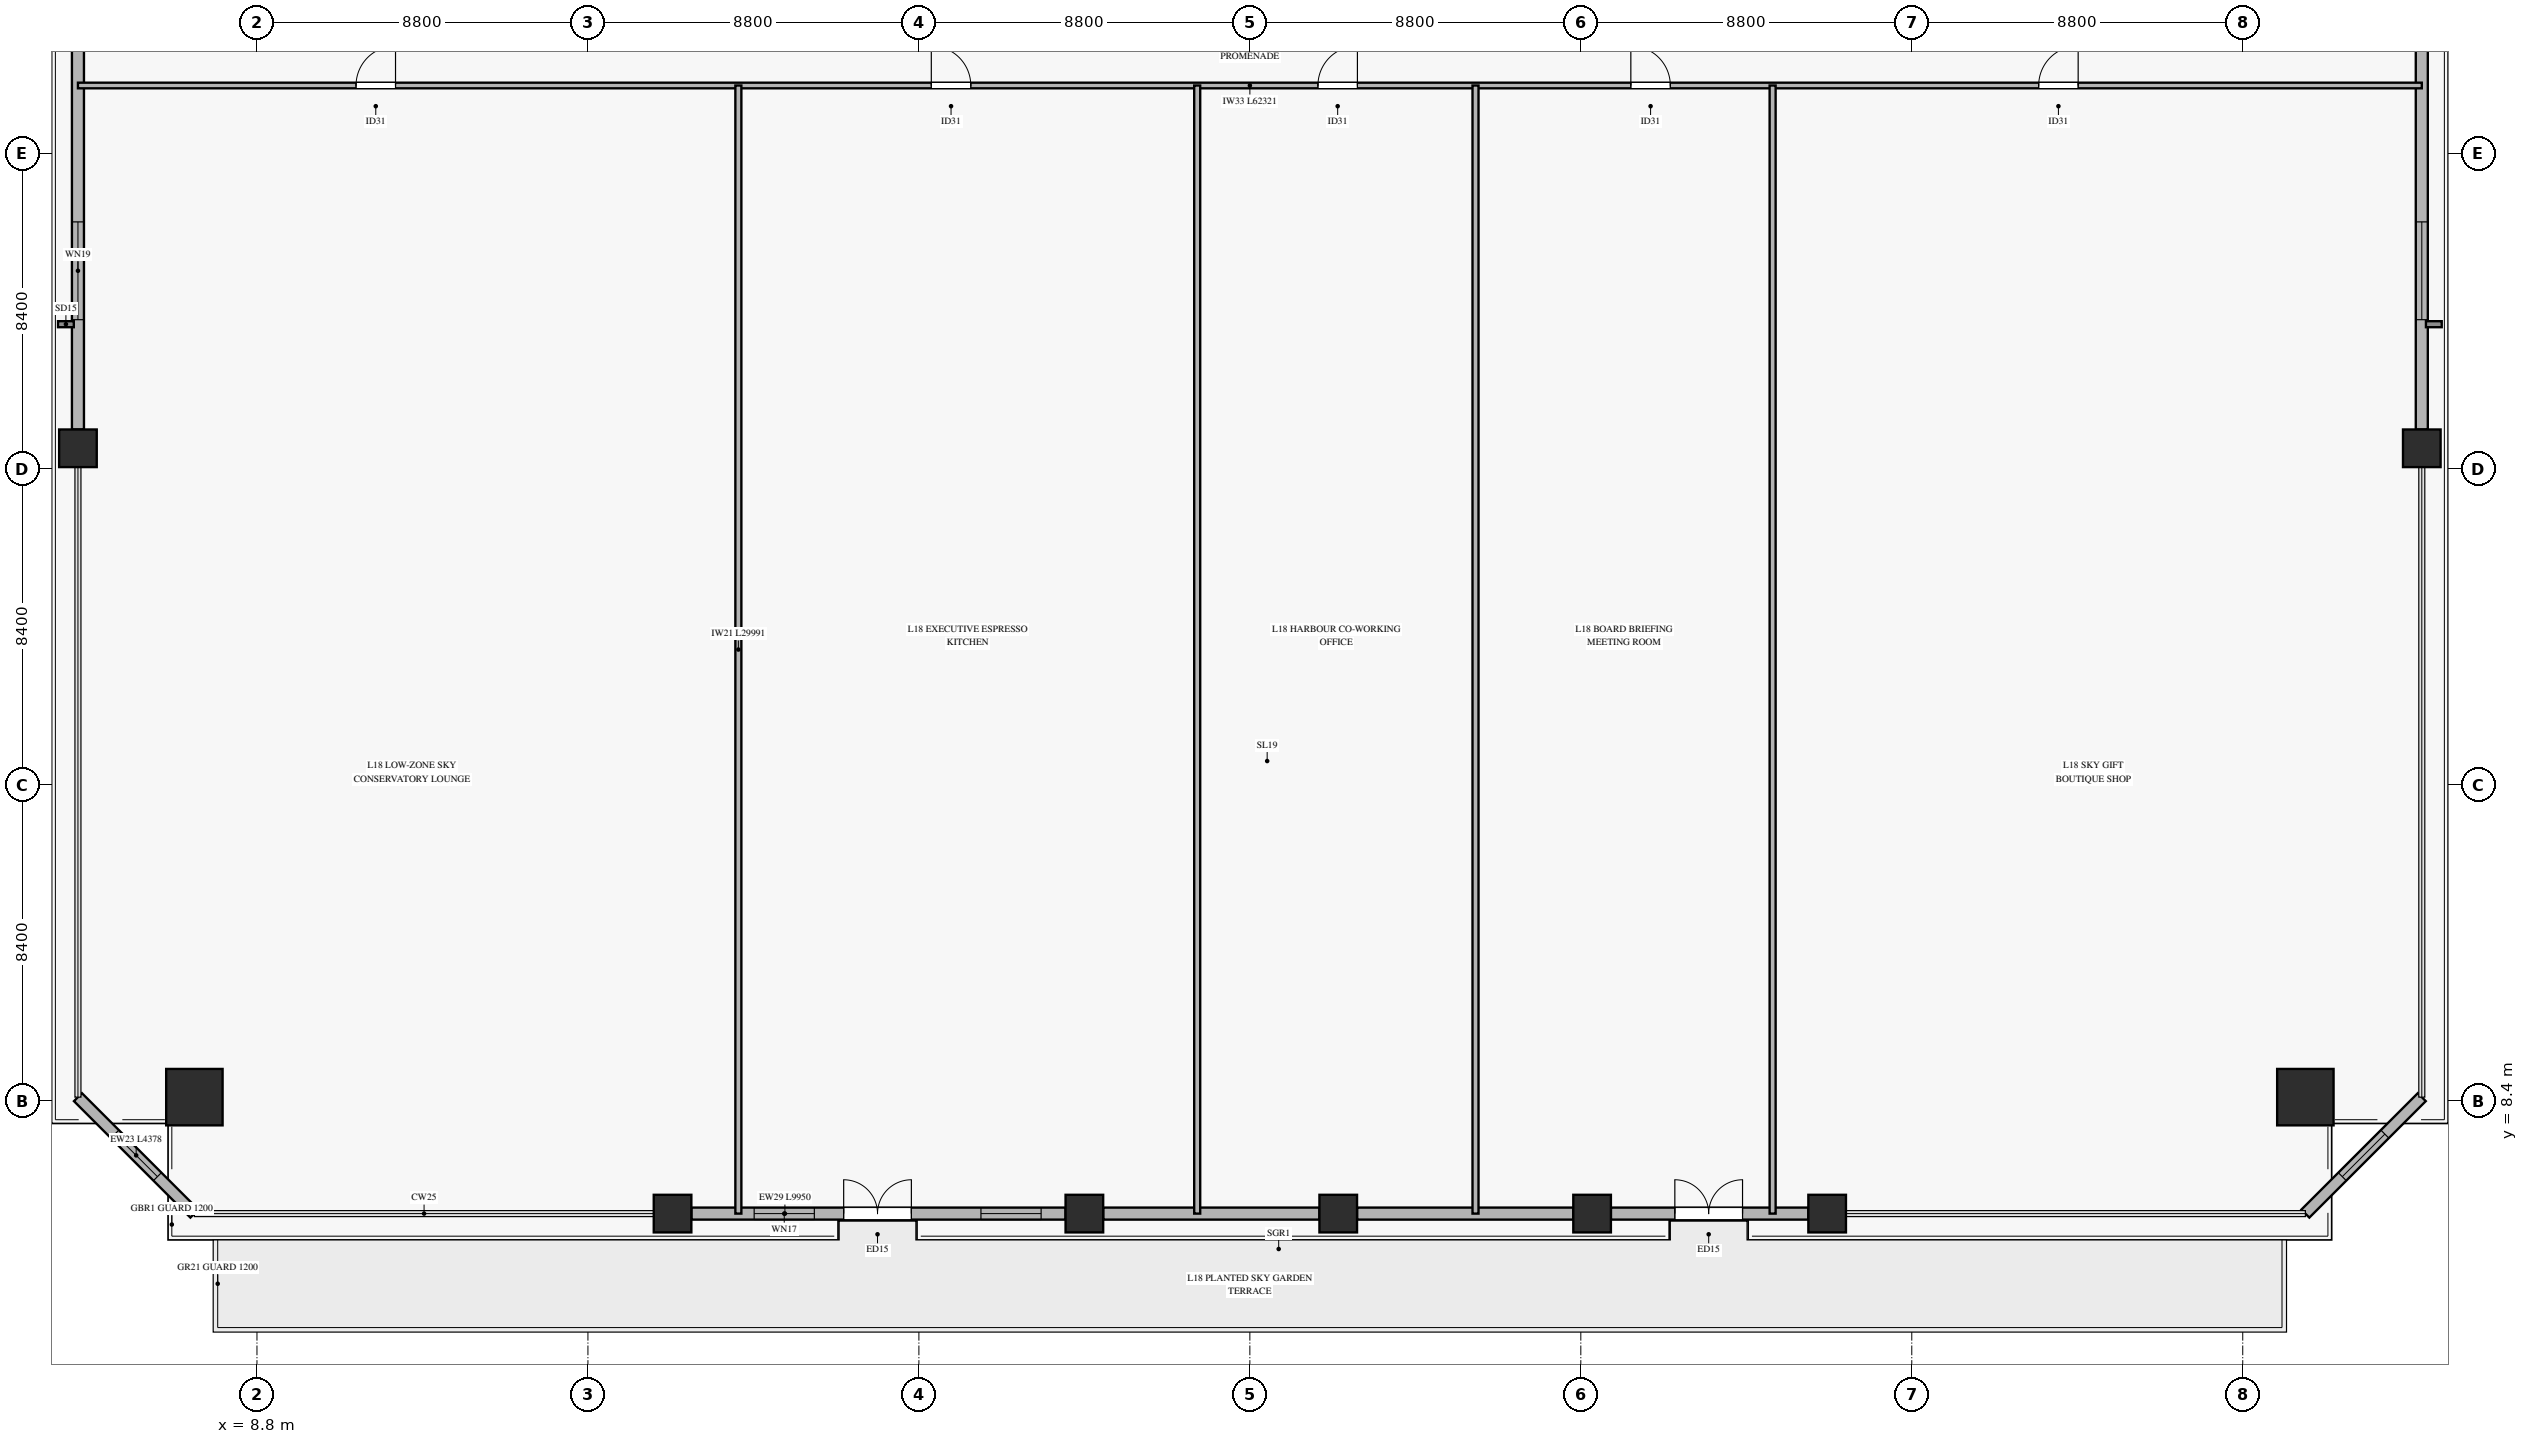
"""IFC4 building model, lengths in metres.
Left out: names, types, materials, properties, quantities, classifications, styles, units other than length and angle.
Written with IfcOpenShell. Run it as: python <this file> out.ifc"""

import sys

from ifc_helpers import new_model, si_unit, direction, frame, frame_2d, origin, origin_2d, place, context, subcontext, project, spatial, rectangle, hollow_rectangle, extrude, source, transform, mapped, element, fill, save


model = new_model("IFC4")
c1 = context("Model", 3, precision=1e-05, world=origin(), true_north=direction((0.0, 1.0)))
c2 = subcontext(c1, "Body", "Model", "MODEL_VIEW")
j1 = project(units=[si_unit("LENGTHUNIT", "METRE"), si_unit("PLANEANGLEUNIT", "RADIAN")], contexts=[c1])
p1 = place(None, origin())
s1 = spatial("IfcSite", under=j1, at=p1, CompositionType="ELEMENT")
p2 = place(p1, origin())
s2 = spatial("IfcBuilding", under=s1, at=p2, CompositionType="ELEMENT")
p3 = place(p2, frame((0.0, 0.0, 72.8)))
s3 = spatial("IfcBuildingStorey", under=s2, at=p3, CompositionType="ELEMENT", Elevation=72.8)
m1 = source(origin(), c2, "Body", "SweptSolid", [
    extrude(hollow_rectangle(XDim=1.5, YDim=1.5, WallThickness=0.07, at=origin_2d()), origin(), (0.0, 0.0, 1.0), 6.58),
])
for number, where, z_axis, x_axis in (
    (1, (7.136, 8.505, 0.0), (0.0, 0.0, 1.0), (1.0, 0.0, 0.0)),
    (2, (63.265, 8.505, 0.0), (0.0, 0.0, 1.0), (1.0, 0.0, 0.0)),
):
    element("IfcColumn", number, at=place(p3, frame(where, z_axis=z_axis, x_axis=x_axis)), inside=s3, PredefinedType="COLUMN", context=c2, shape_type="MappedRepresentation", body=[
        mapped(m1, transform((0.0, 0.0, 0.0), x_axis=(1.0, 0.0, 0.0), y_axis=(0.0, 1.0, 0.0), z_axis=(0.0, 0.0, 1.0), scale=1.0)),
    ])
m2 = source(origin(), c2, "Body", "SweptSolid", [
    extrude(hollow_rectangle(XDim=1.0, YDim=1.0, WallThickness=0.045, at=origin_2d()), origin(), (0.0, 0.0, 1.0), 6.58),
])
for number, where, z_axis, x_axis in (
    (3, (19.85, 5.409, 0.0), (0.0, 0.0, 1.0), (1.0, 0.0, 0.0)),
    (4, (30.8, 5.409, 0.0), (0.0, 0.0, 1.0), (1.0, 0.0, 0.0)),
    (5, (37.55, 5.409, 0.0), (0.0, 0.0, 1.0), (1.0, 0.0, 0.0)),
    (6, (44.3, 5.409, 0.0), (0.0, 0.0, 1.0), (1.0, 0.0, 0.0)),
    (7, (50.55, 5.409, 0.0), (0.0, 0.0, 1.0), (1.0, 0.0, 0.0)),
    (8, (4.04, 25.755, 0.0), (0.0, 0.0, 1.0), (1.0, 0.0, 0.0)),
    (9, (66.361, 25.755, 0.0), (0.0, 0.0, 1.0), (1.0, 0.0, 0.0)),
):
    element("IfcColumn", number, at=place(p3, frame(where, z_axis=z_axis, x_axis=x_axis)), inside=s3, PredefinedType="COLUMN", context=c2, shape_type="MappedRepresentation", body=[
        mapped(m2, transform((0.0, 0.0, 0.0), x_axis=(1.0, 0.0, 0.0), y_axis=(0.0, 1.0, 0.0), z_axis=(0.0, 0.0, 1.0), scale=1.0)),
    ])
p4 = place(p3, frame((20.35, 5.409, 0.0), z_axis=(0.0, 0.0, 1.0), x_axis=(1.0, 0.0, 0.0)))
e10 = element("IfcWall", 10, at=p4, inside=s3, PredefinedType="SOLIDWALL", context=c2, shape_type="SweptSolid", body=[
    extrude(rectangle(XDim=9.95, YDim=0.32, at=frame_2d((4.975, 0.0))), origin(), (0.0, 0.0, 1.0), 6.06),
])
p5 = place(p4, frame((4.05, 0.0, 0.0)))
e11 = element("IfcOpeningElement", 11, at=p5, cuts=e10, PredefinedType="OPENING", context=c2, shape_type="SweptSolid", body=[
    extrude(rectangle(XDim=1.8, YDim=2.3, at=frame_2d((0.9, 1.15))), frame((0.0, 0.17, 0.0), z_axis=(0.0, -1.0, 0.0), x_axis=(1.0, 0.0, 0.0)), (0.0, 0.0, 1.0), 0.34),
])
p6 = place(p4, frame((1.67, 0.0, 0.45)))
e12 = element("IfcOpeningElement", 12, at=p6, cuts=e10, PredefinedType="OPENING", context=c2, shape_type="SweptSolid", body=[
    extrude(rectangle(XDim=1.6, YDim=2.0, at=frame_2d((0.8, 1.0))), frame((0.0, 0.17, 0.0), z_axis=(0.0, -1.0, 0.0), x_axis=(1.0, 0.0, 0.0)), (0.0, 0.0, 1.0), 0.34),
])
p7 = place(p4, frame((7.7, 0.0, 0.45)))
e13 = element("IfcOpeningElement", 13, at=p7, cuts=e10, PredefinedType="OPENING", context=c2, shape_type="SweptSolid", body=[
    extrude(rectangle(XDim=1.6, YDim=2.0, at=frame_2d((0.8, 1.0))), frame((0.0, 0.17, 0.0), z_axis=(0.0, -1.0, 0.0), x_axis=(1.0, 0.0, 0.0)), (0.0, 0.0, 1.0), 0.34),
])
for number, where, z_axis, x_axis in (
    (14, (31.3, 5.409, 0.0), (0.0, 0.0, 1.0), (1.0, 0.0, 0.0)),
    (15, (38.05, 5.409, 0.0), (0.0, 0.0, 1.0), (1.0, 0.0, 0.0)),
):
    element("IfcWall", number, at=place(p3, frame(where, z_axis=z_axis, x_axis=x_axis)), inside=s3, PredefinedType="SOLIDWALL", context=c2, shape_type="SweptSolid", body=[
        extrude(rectangle(XDim=5.75, YDim=0.32, at=frame_2d((2.875, 0.0))), origin(), (0.0, 0.0, 1.0), 6.06),
    ])
p8 = place(p3, frame((44.8, 5.409, 0.0), z_axis=(0.0, 0.0, 1.0), x_axis=(1.0, 0.0, 0.0)))
e16 = element("IfcWall", 16, at=p8, inside=s3, PredefinedType="SOLIDWALL", context=c2, shape_type="SweptSolid", body=[
    extrude(rectangle(XDim=5.25, YDim=0.32, at=frame_2d((2.625, 0.0))), origin(), (0.0, 0.0, 1.0), 6.06),
])
p9 = place(p8, frame((1.7, 0.0, 0.0)))
e17 = element("IfcOpeningElement", 17, at=p9, cuts=e16, PredefinedType="OPENING", context=c2, shape_type="SweptSolid", body=[
    extrude(rectangle(XDim=1.8, YDim=2.3, at=frame_2d((0.9, 1.15))), frame((0.0, 0.17, 0.0), z_axis=(0.0, -1.0, 0.0), x_axis=(1.0, 0.0, 0.0)), (0.0, 0.0, 1.0), 0.34),
])
p10 = place(p3, frame((4.04, 26.255, 0.0), z_axis=(0.0, 0.0, 1.0), x_axis=(0.0, 1.0, 0.0)))
e18 = element("IfcWall", 18, at=p10, inside=s3, PredefinedType="SOLIDWALL", context=c2, shape_type="SweptSolid", body=[
    extrude(rectangle(XDim=16.749, YDim=0.32, at=frame_2d((8.375, 0.0))), origin(), (0.0, 0.0, 1.0), 6.06),
])
p11 = place(p10, frame((2.919, 0.0, 0.45)))
e19 = element("IfcOpeningElement", 19, at=p11, cuts=e18, PredefinedType="OPENING", context=c2, shape_type="SweptSolid", body=[
    extrude(rectangle(XDim=2.6, YDim=2.4, at=frame_2d((1.3, 1.2))), frame((0.0, 0.17, 0.0), z_axis=(0.0, -1.0, 0.0), x_axis=(1.0, 0.0, 0.0)), (0.0, 0.0, 1.0), 0.34),
])
p12 = place(p3, frame((66.361, 26.255, 0.0), z_axis=(0.0, 0.0, 1.0), x_axis=(0.0, 1.0, 0.0)))
e20 = element("IfcWall", 20, at=p12, inside=s3, PredefinedType="SOLIDWALL", context=c2, shape_type="SweptSolid", body=[
    extrude(rectangle(XDim=16.749, YDim=0.32, at=frame_2d((8.375, 0.0))), origin(), (0.0, 0.0, 1.0), 6.06),
])
p13 = place(p12, frame((2.919, 0.0, 0.45)))
e21 = element("IfcOpeningElement", 21, at=p13, cuts=e20, PredefinedType="OPENING", context=c2, shape_type="SweptSolid", body=[
    extrude(rectangle(XDim=2.6, YDim=2.4, at=frame_2d((1.3, 1.2))), frame((0.0, 0.17, 0.0), z_axis=(0.0, -1.0, 0.0), x_axis=(1.0, 0.0, 0.0)), (0.0, 0.0, 1.0), 0.34),
])
p14 = place(p3, frame((4.04, 8.505, 0.0), z_axis=(0.0, 0.0, 1.0), x_axis=(0.707106781187, -0.707106781187, 0.0)))
e22 = element("IfcWall", 22, at=p14, inside=s3, PredefinedType="SOLIDWALL", context=c2, shape_type="SweptSolid", body=[
    extrude(rectangle(XDim=4.378, YDim=0.3, at=frame_2d((2.189, 0.0))), origin(), (0.0, 0.0, 1.0), 6.06),
])
p15 = place(p14, frame((1.389, 0.0, 0.45)))
e23 = element("IfcOpeningElement", 23, at=p15, cuts=e22, PredefinedType="OPENING", context=c2, shape_type="SweptSolid", body=[
    extrude(rectangle(XDim=1.6, YDim=2.0, at=frame_2d((0.8, 1.0))), frame((0.0, 0.16, 0.0), z_axis=(0.0, -1.0, 0.0), x_axis=(1.0, 0.0, 0.0)), (0.0, 0.0, 1.0), 0.32),
])
p16 = place(p3, frame((63.265, 5.409, 0.0), z_axis=(0.0, 0.0, 1.0), x_axis=(0.707134660098, 0.707078901175, 0.0)))
e24 = element("IfcWall", 24, at=p16, inside=s3, PredefinedType="SOLIDWALL", context=c2, shape_type="SweptSolid", body=[
    extrude(rectangle(XDim=4.378, YDim=0.3, at=frame_2d((2.189, 0.0))), origin(), (0.0, 0.0, 1.0), 6.06),
])
p17 = place(p16, frame((1.389, 0.0, 0.45)))
e25 = element("IfcOpeningElement", 25, at=p17, cuts=e24, PredefinedType="OPENING", context=c2, shape_type="SweptSolid", body=[
    extrude(rectangle(XDim=1.6, YDim=2.0, at=frame_2d((0.8, 1.0))), frame((0.0, 0.16, 0.0), z_axis=(0.0, -1.0, 0.0), x_axis=(1.0, 0.0, 0.0)), (0.0, 0.0, 1.0), 0.32),
])
p18 = place(p3, frame((4.04, 35.4, 0.0), z_axis=(0.0, 0.0, 1.0), x_axis=(1.0, 0.0, 0.0)))
e26 = element("IfcWall", 26, at=p18, inside=s3, PredefinedType="PARTITIONING", context=c2, shape_type="SweptSolid", body=[
    extrude(rectangle(XDim=62.321, YDim=0.15, at=frame_2d((31.161, 0.0))), origin(), (0.0, 0.0, 1.0), 5.665),
])
p19 = place(p18, frame((7.394, 0.0, 0.0)))
e27 = element("IfcOpeningElement", 27, at=p19, cuts=e26, PredefinedType="OPENING", context=c2, shape_type="SweptSolid", body=[
    extrude(rectangle(XDim=1.05, YDim=2.15, at=frame_2d((0.525, 1.075))), frame((0.0, 0.085, 0.0), z_axis=(0.0, -1.0, 0.0), x_axis=(1.0, 0.0, 0.0)), (0.0, 0.0, 1.0), 0.17),
])
p20 = place(p18, frame((22.69, 0.0, 0.0)))
e28 = element("IfcOpeningElement", 28, at=p20, cuts=e26, PredefinedType="OPENING", context=c2, shape_type="SweptSolid", body=[
    extrude(rectangle(XDim=1.05, YDim=2.15, at=frame_2d((0.525, 1.075))), frame((0.0, 0.085, 0.0), z_axis=(0.0, -1.0, 0.0), x_axis=(1.0, 0.0, 0.0)), (0.0, 0.0, 1.0), 0.17),
])
p21 = place(p18, frame((32.97, 0.0, 0.0)))
e29 = element("IfcOpeningElement", 29, at=p21, cuts=e26, PredefinedType="OPENING", context=c2, shape_type="SweptSolid", body=[
    extrude(rectangle(XDim=1.05, YDim=2.15, at=frame_2d((0.525, 1.075))), frame((0.0, 0.085, 0.0), z_axis=(0.0, -1.0, 0.0), x_axis=(1.0, 0.0, 0.0)), (0.0, 0.0, 1.0), 0.17),
])
p22 = place(p18, frame((41.29, 0.0, 0.0)))
e30 = element("IfcOpeningElement", 30, at=p22, cuts=e26, PredefinedType="OPENING", context=c2, shape_type="SweptSolid", body=[
    extrude(rectangle(XDim=1.05, YDim=2.15, at=frame_2d((0.525, 1.075))), frame((0.0, 0.085, 0.0), z_axis=(0.0, -1.0, 0.0), x_axis=(1.0, 0.0, 0.0)), (0.0, 0.0, 1.0), 0.17),
])
p23 = place(p18, frame((52.134, 0.0, 0.0)))
e31 = element("IfcOpeningElement", 31, at=p23, cuts=e26, PredefinedType="OPENING", context=c2, shape_type="SweptSolid", body=[
    extrude(rectangle(XDim=1.05, YDim=2.15, at=frame_2d((0.525, 1.075))), frame((0.0, 0.085, 0.0), z_axis=(0.0, -1.0, 0.0), x_axis=(1.0, 0.0, 0.0)), (0.0, 0.0, 1.0), 0.17),
])
for number, where, z_axis, x_axis in (
    (32, (21.6, 5.409, 0.0), (0.0, 0.0, 1.0), (0.0, 1.0, 0.0)),
    (33, (33.8, 5.409, 0.0), (0.0, 0.0, 1.0), (0.0, 1.0, 0.0)),
    (34, (41.2, 5.409, 0.0), (0.0, 0.0, 1.0), (0.0, 1.0, 0.0)),
    (35, (49.1, 5.409, 0.0), (0.0, 0.0, 1.0), (0.0, 1.0, 0.0)),
):
    element("IfcWall", number, at=place(p3, frame(where, z_axis=z_axis, x_axis=x_axis)), inside=s3, PredefinedType="PARTITIONING", context=c2, shape_type="SweptSolid", body=[
        extrude(rectangle(XDim=29.991, YDim=0.16, at=frame_2d((14.996, 0.0))), origin(), (0.0, 0.0, 1.0), 6.065),
    ])
m3 = source(origin(), c2, "Body", "SweptSolid", [
    extrude(rectangle(XDim=1.8, YDim=2.3, at=frame_2d((0.9, 1.15))), frame((0.0, 0.025, 0.0), z_axis=(0.0, -1.0, 0.0), x_axis=(1.0, 0.0, 0.0)), (0.0, 0.0, 1.0), 0.05),
])
p24 = place(p5, origin())
e36 = element("IfcDoor", 36, at=p24, inside=s3, OperationType="DOUBLE_SWING_LEFT", PredefinedType="DOOR", context=c2, shape_type="MappedRepresentation", body=[
    mapped(m3, transform((0.0, 0.0, 0.0), x_axis=(1.0, 0.0, 0.0), y_axis=(0.0, 1.0, 0.0), z_axis=(0.0, 0.0, 1.0), scale=1.0)),
])
fill(e11, e36)
m4 = source(origin(), c2, "Body", "SweptSolid", [
    extrude(rectangle(XDim=1.6, YDim=2.0, at=frame_2d((0.8, 1.0))), frame((0.0, 0.03, 0.0), z_axis=(0.0, -1.0, 0.0), x_axis=(1.0, 0.0, 0.0)), (0.0, 0.0, 1.0), 0.06),
])
p25 = place(p6, origin())
e37 = element("IfcWindow", 37, at=p25, inside=s3, PartitioningType="SINGLE_PANEL", PredefinedType="WINDOW", context=c2, shape_type="MappedRepresentation", body=[
    mapped(m4, transform((0.0, 0.0, 0.0), x_axis=(1.0, 0.0, 0.0), y_axis=(0.0, 1.0, 0.0), z_axis=(0.0, 0.0, 1.0), scale=1.0)),
])
fill(e12, e37)
p26 = place(p7, origin())
e38 = element("IfcWindow", 38, at=p26, inside=s3, PartitioningType="SINGLE_PANEL", PredefinedType="WINDOW", context=c2, shape_type="MappedRepresentation", body=[
    mapped(m4, transform((0.0, 0.0, 0.0), x_axis=(1.0, 0.0, 0.0), y_axis=(0.0, 1.0, 0.0), z_axis=(0.0, 0.0, 1.0), scale=1.0)),
])
fill(e13, e38)
p27 = place(p9, origin())
e39 = element("IfcDoor", 39, at=p27, inside=s3, OperationType="DOUBLE_SWING_RIGHT", PredefinedType="DOOR", context=c2, shape_type="MappedRepresentation", body=[
    mapped(m3, transform((0.0, 0.0, 0.0), x_axis=(1.0, 0.0, 0.0), y_axis=(0.0, 1.0, 0.0), z_axis=(0.0, 0.0, 1.0), scale=1.0)),
])
fill(e17, e39)
m5 = source(origin(), c2, "Body", "SweptSolid", [
    extrude(rectangle(XDim=2.6, YDim=2.4, at=frame_2d((1.3, 1.2))), frame((0.0, 0.03, 0.0), z_axis=(0.0, -1.0, 0.0), x_axis=(1.0, 0.0, 0.0)), (0.0, 0.0, 1.0), 0.06),
])
p28 = place(p11, origin())
e40 = element("IfcWindow", 40, at=p28, inside=s3, PartitioningType="SINGLE_PANEL", PredefinedType="WINDOW", context=c2, shape_type="MappedRepresentation", body=[
    mapped(m5, transform((0.0, 0.0, 0.0), x_axis=(1.0, 0.0, 0.0), y_axis=(0.0, 1.0, 0.0), z_axis=(0.0, 0.0, 1.0), scale=1.0)),
])
fill(e19, e40)
p29 = place(p13, origin())
e41 = element("IfcWindow", 41, at=p29, inside=s3, PartitioningType="SINGLE_PANEL", PredefinedType="WINDOW", context=c2, shape_type="MappedRepresentation", body=[
    mapped(m5, transform((0.0, 0.0, 0.0), x_axis=(1.0, 0.0, 0.0), y_axis=(0.0, 1.0, 0.0), z_axis=(0.0, 0.0, 1.0), scale=1.0)),
])
fill(e21, e41)
p30 = place(p15, origin())
e42 = element("IfcWindow", 42, at=p30, inside=s3, PartitioningType="SINGLE_PANEL", PredefinedType="WINDOW", context=c2, shape_type="MappedRepresentation", body=[
    mapped(m4, transform((0.0, 0.0, 0.0), x_axis=(1.0, 0.0, 0.0), y_axis=(0.0, 1.0, 0.0), z_axis=(0.0, 0.0, 1.0), scale=1.0)),
])
fill(e23, e42)
p31 = place(p17, origin())
e43 = element("IfcWindow", 43, at=p31, inside=s3, PartitioningType="SINGLE_PANEL", PredefinedType="WINDOW", context=c2, shape_type="MappedRepresentation", body=[
    mapped(m4, transform((0.0, 0.0, 0.0), x_axis=(1.0, 0.0, 0.0), y_axis=(0.0, 1.0, 0.0), z_axis=(0.0, 0.0, 1.0), scale=1.0)),
])
fill(e25, e43)
m6 = source(origin(), c2, "Body", "SweptSolid", [
    extrude(rectangle(XDim=1.05, YDim=2.15, at=frame_2d((0.525, 1.075))), frame((0.0, 0.025, 0.0), z_axis=(0.0, -1.0, 0.0), x_axis=(1.0, 0.0, 0.0)), (0.0, 0.0, 1.0), 0.05),
])
p32 = place(p19, origin())
e44 = element("IfcDoor", 44, at=p32, inside=s3, OperationType="SINGLE_SWING_RIGHT", PredefinedType="DOOR", context=c2, shape_type="MappedRepresentation", body=[
    mapped(m6, transform((0.0, 0.0, 0.0), x_axis=(1.0, 0.0, 0.0), y_axis=(0.0, 1.0, 0.0), z_axis=(0.0, 0.0, 1.0), scale=1.0)),
])
fill(e27, e44)
p33 = place(p20, origin())
e45 = element("IfcDoor", 45, at=p33, inside=s3, OperationType="SINGLE_SWING_LEFT", PredefinedType="DOOR", context=c2, shape_type="MappedRepresentation", body=[
    mapped(m6, transform((0.0, 0.0, 0.0), x_axis=(1.0, 0.0, 0.0), y_axis=(0.0, 1.0, 0.0), z_axis=(0.0, 0.0, 1.0), scale=1.0)),
])
fill(e28, e45)
p34 = place(p21, origin())
e46 = element("IfcDoor", 46, at=p34, inside=s3, OperationType="SINGLE_SWING_RIGHT", PredefinedType="DOOR", context=c2, shape_type="MappedRepresentation", body=[
    mapped(m6, transform((0.0, 0.0, 0.0), x_axis=(1.0, 0.0, 0.0), y_axis=(0.0, 1.0, 0.0), z_axis=(0.0, 0.0, 1.0), scale=1.0)),
])
fill(e29, e46)
p35 = place(p22, origin())
e47 = element("IfcDoor", 47, at=p35, inside=s3, OperationType="SINGLE_SWING_LEFT", PredefinedType="DOOR", context=c2, shape_type="MappedRepresentation", body=[
    mapped(m6, transform((0.0, 0.0, 0.0), x_axis=(1.0, 0.0, 0.0), y_axis=(0.0, 1.0, 0.0), z_axis=(0.0, 0.0, 1.0), scale=1.0)),
])
fill(e30, e47)
p36 = place(p23, origin())
e48 = element("IfcDoor", 48, at=p36, inside=s3, OperationType="SINGLE_SWING_RIGHT", PredefinedType="DOOR", context=c2, shape_type="MappedRepresentation", body=[
    mapped(m6, transform((0.0, 0.0, 0.0), x_axis=(1.0, 0.0, 0.0), y_axis=(0.0, 1.0, 0.0), z_axis=(0.0, 0.0, 1.0), scale=1.0)),
])
fill(e31, e48)
save(model, sys.argv[1])
